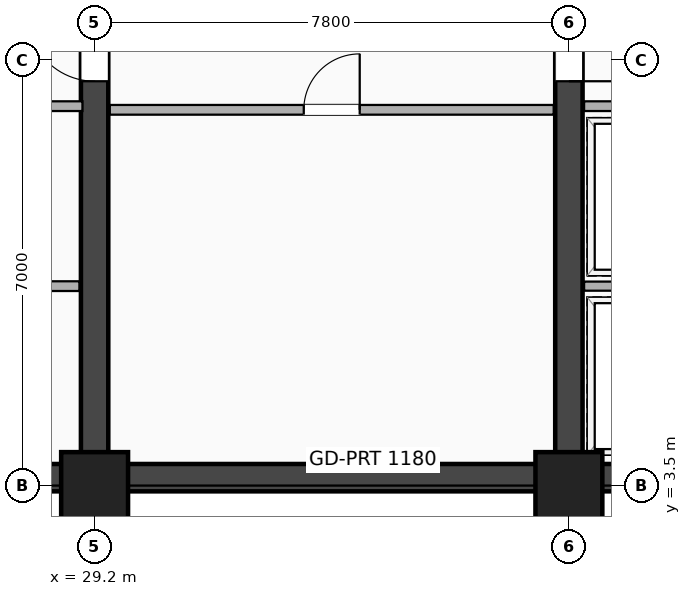
"""IFC4 building model, lengths in metres.
Left out: names, types, materials, properties, quantities, classifications, styles, units other than length and angle.
Written with IfcOpenShell. Run it as: python <this file> out.ifc"""

import sys

from ifc_helpers import new_model, si_unit, direction, frame, frame_2d, origin, origin_2d, place, context, subcontext, project, spatial, rectangle, extrude, element, fill, save


model = new_model("IFC4")
c1 = context("Model", 3, precision=1e-05, world=origin(), true_north=direction((0.0, 1.0)))
c2 = subcontext(c1, "Body", "Model", "MODEL_VIEW")
j1 = project(units=[si_unit("LENGTHUNIT", "METRE"), si_unit("PLANEANGLEUNIT", "RADIAN")], contexts=[c1])
p1 = place(None, origin())
s1 = spatial("IfcSite", under=j1, at=p1, CompositionType="ELEMENT")
p2 = place(p1, origin())
s2 = spatial("IfcBuilding", under=s1, at=p2, CompositionType="ELEMENT")
p3 = place(p2, frame((0.0, 0.0, 184.1)))
s3 = spatial("IfcBuildingStorey", under=s2, at=p3, CompositionType="ELEMENT", Elevation=184.1)
p4 = place(p3, frame((20.3, 3.63, 0.0), z_axis=(0.0, 0.0, 1.0), x_axis=(1.0, 0.0, 0.0)))
e1 = element("IfcWall", 1, at=p4, inside=s3, PredefinedType="SHEAR", context=c2, shape_type="SweptSolid", body=[
    extrude(rectangle(XDim=24.5, YDim=0.45, at=frame_2d((12.25, 0.0))), origin(), (0.0, 0.0, 1.0), 8.16),
])
p5 = place(p3, frame((29.2, 3.5, 0.0), z_axis=(0.0, 0.0, 1.0), x_axis=(0.0, 1.0, 0.0)))
e2 = element("IfcWall", 2, at=p5, inside=s3, PredefinedType="SHEAR", context=c2, shape_type="SweptSolid", body=[
    extrude(rectangle(XDim=14.95, YDim=0.45, at=frame_2d((7.475, 0.0))), origin(), (0.0, 0.0, 1.0), 8.16),
])
p6 = place(p5, frame((7.75, 0.0, 0.0), z_axis=(0.0, 0.0, 1.0), x_axis=(-1.0, 0.0, 0.0)))
e3 = element("IfcOpeningElement", 3, at=p6, cuts=e2, PredefinedType="OPENING", context=c2, shape_type="SweptSolid", body=[
    extrude(rectangle(XDim=1.1, YDim=2.15, at=frame_2d((0.55, 1.075))), frame((0.0, 0.235, 0.0), z_axis=(0.0, -1.0, 0.0), x_axis=(1.0, 0.0, 0.0)), (0.0, 0.0, 1.0), 0.47),
])
p7 = place(p3, frame((37.0, 3.5, 0.0), z_axis=(0.0, 0.0, 1.0), x_axis=(0.0, 1.0, 0.0)))
e4 = element("IfcWall", 4, at=p7, inside=s3, PredefinedType="SHEAR", context=c2, shape_type="SweptSolid", body=[
    extrude(rectangle(XDim=14.95, YDim=0.45, at=frame_2d((7.475, 0.0))), origin(), (0.0, 0.0, 1.0), 8.16),
])
p8 = place(p7, frame((6.65, 0.0, 0.0)))
e5 = element("IfcOpeningElement", 5, at=p8, cuts=e4, PredefinedType="OPENING", context=c2, shape_type="SweptSolid", body=[
    extrude(rectangle(XDim=1.1, YDim=2.15, at=frame_2d((0.55, 1.075))), frame((0.0, 0.235, 0.0), z_axis=(0.0, -1.0, 0.0), x_axis=(1.0, 0.0, 0.0)), (0.0, 0.0, 1.0), 0.47),
])
for number, where, z_axis, x_axis in (
    (6, (29.2, 3.5, -0.32), (0.0, 0.0, 1.0), (1.0, 0.0, 0.0)),
    (7, (37.0, 3.5, -0.32), (0.0, 0.0, 1.0), (1.0, 0.0, 0.0)),
):
    element("IfcColumn", number, at=place(p3, frame(where, z_axis=z_axis, x_axis=x_axis)), inside=s3, PredefinedType="COLUMN", context=c2, shape_type="SweptSolid", body=[
        extrude(rectangle(XDim=1.1, YDim=1.1, at=origin_2d()), origin(), (0.0, 0.0, 1.0), 8.48),
    ])
p9 = place(p3, frame((20.65, 6.78, 0.0), z_axis=(0.0, 0.0, 1.0), x_axis=(1.0, 0.0, 0.0)))
e8 = element("IfcWall", 8, at=p9, inside=s3, PredefinedType="PARTITIONING", context=c2, shape_type="SweptSolid", body=[
    extrude(rectangle(XDim=8.3, YDim=0.16, at=frame_2d((4.15, 0.0))), origin(), (0.0, 0.0, 1.0), 7.29),
])
p10 = place(p3, frame((24.2, 9.74, 0.0), z_axis=(0.0, 0.0, 1.0), x_axis=(1.0, 0.0, 0.0)))
e9 = element("IfcWall", 9, at=p10, inside=s3, PredefinedType="PARTITIONING", context=c2, shape_type="SweptSolid", body=[
    extrude(rectangle(XDim=4.8, YDim=0.16, at=frame_2d((2.4, 0.0))), origin(), (0.0, 0.0, 1.0), 8.16),
])
p11 = place(p10, frame((1.85, 0.0, 0.0)))
e10 = element("IfcOpeningElement", 10, at=p11, cuts=e9, PredefinedType="OPENING", context=c2, shape_type="SweptSolid", body=[
    extrude(rectangle(XDim=1.1, YDim=2.15, at=frame_2d((0.55, 1.075))), frame((0.0, 0.09, 0.0), z_axis=(0.0, -1.0, 0.0), x_axis=(1.0, 0.0, 0.0)), (0.0, 0.0, 1.0), 0.18),
])
p12 = place(p3, frame((37.25, 6.78, 0.0), z_axis=(0.0, 0.0, 1.0), x_axis=(1.0, 0.0, 0.0)))
e11 = element("IfcWall", 11, at=p12, inside=s3, PredefinedType="PARTITIONING", context=c2, shape_type="SweptSolid", body=[
    extrude(rectangle(XDim=2.17, YDim=0.15, at=frame_2d((1.085, 0.0))), origin(), (0.0, 0.0, 1.0), 8.16),
])
p13 = place(p3, frame((37.25, 9.74, 0.0), z_axis=(0.0, 0.0, 1.0), x_axis=(1.0, 0.0, 0.0)))
e12 = element("IfcWall", 12, at=p13, inside=s3, PredefinedType="PARTITIONING", context=c2, shape_type="SweptSolid", body=[
    extrude(rectangle(XDim=2.17, YDim=0.16, at=frame_2d((1.085, 0.0))), origin(), (0.0, 0.0, 1.0), 8.16),
])
p14 = place(p3, frame((29.45, 9.68, 0.0), z_axis=(0.0, 0.0, 1.0), x_axis=(1.0, 0.0, 0.0)))
e13 = element("IfcWall", 13, at=p14, inside=s3, PredefinedType="PARTITIONING", context=c2, shape_type="SweptSolid", body=[
    extrude(rectangle(XDim=7.3, YDim=0.16, at=frame_2d((3.65, 0.0))), origin(), (0.0, 0.0, 1.0), 8.16),
])
p15 = place(p14, frame((4.11, 0.0, 0.0), z_axis=(0.0, 0.0, 1.0), x_axis=(-1.0, 0.0, 0.0)))
e14 = element("IfcOpeningElement", 14, at=p15, cuts=e13, PredefinedType="OPENING", context=c2, shape_type="SweptSolid", body=[
    extrude(rectangle(XDim=0.92, YDim=2.08, at=frame_2d((0.46, 1.04))), frame((0.0, 0.09, 0.0), z_axis=(0.0, -1.0, 0.0), x_axis=(1.0, 0.0, 0.0)), (0.0, 0.0, 1.0), 0.18),
])
p16 = place(p6, origin())
e15 = element("IfcDoor", 15, at=p16, inside=s3, OperationType="SINGLE_SWING_RIGHT", PredefinedType="DOOR", context=c2, shape_type="SweptSolid", body=[
    extrude(rectangle(XDim=1.1, YDim=2.15, at=frame_2d((0.55, 1.075))), frame((0.0, 0.025, 0.0), z_axis=(0.0, -1.0, 0.0), x_axis=(1.0, 0.0, 0.0)), (0.0, 0.0, 1.0), 0.05),
])
fill(e3, e15)
p17 = place(p8, origin())
e16 = element("IfcDoor", 16, at=p17, inside=s3, OperationType="SINGLE_SWING_LEFT", PredefinedType="DOOR", context=c2, shape_type="SweptSolid", body=[
    extrude(rectangle(XDim=1.1, YDim=2.15, at=frame_2d((0.55, 1.075))), frame((0.0, 0.025, 0.0), z_axis=(0.0, -1.0, 0.0), x_axis=(1.0, 0.0, 0.0)), (0.0, 0.0, 1.0), 0.05),
])
fill(e5, e16)
p18 = place(p15, origin())
e17 = element("IfcDoor", 17, at=p18, inside=s3, OperationType="SINGLE_SWING_RIGHT", PredefinedType="DOOR", context=c2, shape_type="SweptSolid", body=[
    extrude(rectangle(XDim=0.92, YDim=2.08, at=frame_2d((0.46, 1.04))), frame((0.0, 0.025, 0.0), z_axis=(0.0, -1.0, 0.0), x_axis=(1.0, 0.0, 0.0)), (0.0, 0.0, 1.0), 0.05),
])
fill(e14, e17)
save(model, sys.argv[1])
